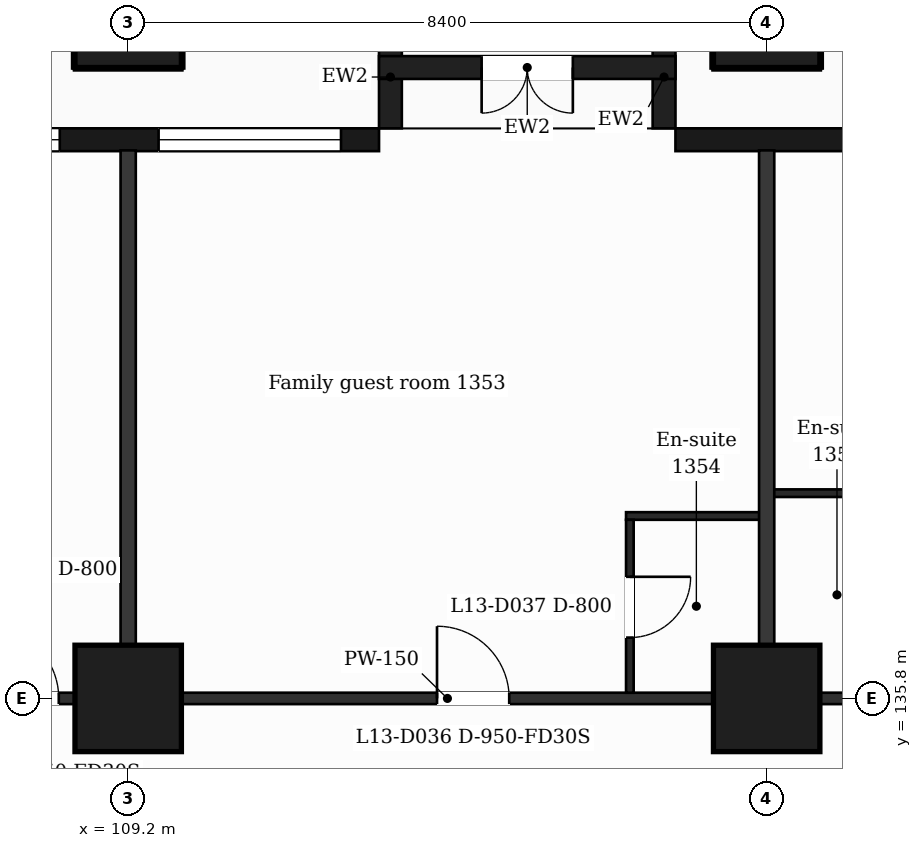
"""IFC4 building model, lengths in metres.
Left out: names, types, materials, properties, quantities, classifications, styles, units other than length and angle.
Written with IfcOpenShell. Run it as: python <this file> out.ifc"""

import sys

from ifc_helpers import new_model, si_unit, direction, frame, frame_2d, origin, origin_2d, place, context, subcontext, project, spatial, rectangle, extrude, element, fill, save


model = new_model("IFC4")
c1 = context("Model", 3, precision=1e-05, world=origin(), true_north=direction((0.0, 1.0)))
c2 = subcontext(c1, "Body", "Model", "MODEL_VIEW")
j1 = project(units=[si_unit("LENGTHUNIT", "METRE"), si_unit("PLANEANGLEUNIT", "RADIAN")], contexts=[c1])
p1 = place(None, origin())
s1 = spatial("IfcSite", under=j1, at=p1, CompositionType="ELEMENT")
p2 = place(p1, origin())
s2 = spatial("IfcBuilding", under=s1, at=p2, CompositionType="ELEMENT")
p3 = place(p2, frame((0.0, 0.0, 63.5)))
s3 = spatial("IfcBuildingStorey", under=s2, at=p3, CompositionType="ELEMENT", Elevation=63.5)
for number, where, z_axis, x_axis in (
    (1, (109.2, 135.8, 0.0), (0.0, 0.0, 1.0), (1.0, 0.0, 0.0)),
    (2, (117.6, 135.8, 0.0), (0.0, 0.0, 1.0), (1.0, 0.0, 0.0)),
    (3, (109.2, 144.8, 0.0), (0.0, 0.0, 1.0), (1.0, 0.0, 0.0)),
    (4, (117.6, 144.8, 0.0), (0.0, 0.0, 1.0), (1.0, 0.0, 0.0)),
):
    element("IfcColumn", number, at=place(p3, frame(where, z_axis=z_axis, x_axis=x_axis)), inside=s3, PredefinedType="COLUMN", context=c2, shape_type="SweptSolid", body=[
        extrude(rectangle(XDim=1.4, YDim=1.4, at=origin_2d()), origin(), (0.0, 0.0, 1.0), 3.5),
    ])
p4 = place(p3, frame((130.65, 143.15, 0.0), z_axis=(0.0, 0.0, 1.0), x_axis=(-1.0, 0.0, 0.0)))
e5 = element("IfcWall", 5, at=p4, inside=s3, PredefinedType="SOLIDWALL", context=c2, shape_type="SweptSolid", body=[
    extrude(rectangle(XDim=14.25, YDim=0.3, at=frame_2d((7.125, 0.0))), origin(), (0.0, 0.0, 1.0), 3.18),
])
p5 = place(p4, frame((1.35, 0.0, 0.9)))
e6 = element("IfcOpeningElement", 6, at=p5, cuts=e5, PredefinedType="OPENING", context=c2, shape_type="SweptSolid", body=[
    extrude(rectangle(XDim=2.4, YDim=2.1, at=frame_2d((1.2, 1.05))), frame((0.0, 0.16, 0.0), z_axis=(0.0, -1.0, 0.0), x_axis=(1.0, 0.0, 0.0)), (0.0, 0.0, 1.0), 0.32),
])
p6 = place(p4, frame((6.15, 0.0, 0.0)))
e7 = element("IfcOpeningElement", 7, at=p6, cuts=e5, PredefinedType="OPENING", context=c2, shape_type="SweptSolid", body=[
    extrude(rectangle(XDim=1.2, YDim=2.4, at=frame_2d((0.6, 1.2))), frame((0.0, 0.16, 0.0), z_axis=(0.0, -1.0, 0.0), x_axis=(1.0, 0.0, 0.0)), (0.0, 0.0, 1.0), 0.32),
])
p7 = place(p4, frame((10.35, 0.0, 0.9)))
e8 = element("IfcOpeningElement", 8, at=p7, cuts=e5, PredefinedType="OPENING", context=c2, shape_type="SweptSolid", body=[
    extrude(rectangle(XDim=1.2, YDim=2.1, at=frame_2d((0.6, 1.05))), frame((0.0, 0.16, 0.0), z_axis=(0.0, -1.0, 0.0), x_axis=(1.0, 0.0, 0.0)), (0.0, 0.0, 1.0), 0.32),
])
p8 = place(p3, frame((112.5, 143.15, 0.0), z_axis=(0.0, 0.0, 1.0), x_axis=(-1.0, 0.0, 0.0)))
e9 = element("IfcWall", 9, at=p8, inside=s3, PredefinedType="SOLIDWALL", context=c2, shape_type="SweptSolid", body=[
    extrude(rectangle(XDim=16.5, YDim=0.3, at=frame_2d((8.25, 0.0))), origin(), (0.0, 0.0, 1.0), 3.18),
])
p9 = place(p8, frame((0.5, 0.0, 0.9)))
e10 = element("IfcOpeningElement", 10, at=p9, cuts=e9, PredefinedType="OPENING", context=c2, shape_type="SweptSolid", body=[
    extrude(rectangle(XDim=2.4, YDim=2.1, at=frame_2d((1.2, 1.05))), frame((0.0, 0.16, 0.0), z_axis=(0.0, -1.0, 0.0), x_axis=(1.0, 0.0, 0.0)), (0.0, 0.0, 1.0), 0.32),
])
p10 = place(p8, frame((4.2, 0.0, 0.9)))
e11 = element("IfcOpeningElement", 11, at=p10, cuts=e9, PredefinedType="OPENING", context=c2, shape_type="SweptSolid", body=[
    extrude(rectangle(XDim=2.4, YDim=2.1, at=frame_2d((1.2, 1.05))), frame((0.0, 0.16, 0.0), z_axis=(0.0, -1.0, 0.0), x_axis=(1.0, 0.0, 0.0)), (0.0, 0.0, 1.0), 0.32),
])
p11 = place(p8, frame((9.0, 0.0, 0.0)))
e12 = element("IfcOpeningElement", 12, at=p11, cuts=e9, PredefinedType="OPENING", context=c2, shape_type="SweptSolid", body=[
    extrude(rectangle(XDim=1.2, YDim=2.4, at=frame_2d((0.6, 1.2))), frame((0.0, 0.16, 0.0), z_axis=(0.0, -1.0, 0.0), x_axis=(1.0, 0.0, 0.0)), (0.0, 0.0, 1.0), 0.32),
])
p12 = place(p8, frame((12.6, 0.0, 0.9)))
e13 = element("IfcOpeningElement", 13, at=p12, cuts=e9, PredefinedType="OPENING", context=c2, shape_type="SweptSolid", body=[
    extrude(rectangle(XDim=2.4, YDim=2.1, at=frame_2d((1.2, 1.05))), frame((0.0, 0.16, 0.0), z_axis=(0.0, -1.0, 0.0), x_axis=(1.0, 0.0, 0.0)), (0.0, 0.0, 1.0), 0.32),
])
for number, where, z_axis, x_axis in (
    (14, (116.25, 143.3, 0.0), (0.0, 0.0, 1.0), (0.0, 1.0, 0.0)),
    (15, (112.65, 143.3, 0.0), (0.0, 0.0, 1.0), (0.0, 1.0, 0.0)),
):
    element("IfcWall", number, at=place(p3, frame(where, z_axis=z_axis, x_axis=x_axis)), inside=s3, PredefinedType="SOLIDWALL", context=c2, shape_type="SweptSolid", body=[
        extrude(rectangle(XDim=1.35, YDim=0.3, at=frame_2d((0.675, 0.0))), origin(), (0.0, 0.0, 1.0), 3.18),
    ])
p13 = place(p3, frame((116.4, 144.1, 0.0), z_axis=(0.0, 0.0, 1.0), x_axis=(-1.0, 0.0, 0.0)))
e16 = element("IfcWall", 16, at=p13, inside=s3, PredefinedType="SOLIDWALL", context=c2, shape_type="SweptSolid", body=[
    extrude(rectangle(XDim=3.9, YDim=0.3, at=frame_2d((1.95, 0.0))), origin(), (0.0, 0.0, 1.0), 3.18),
])
p14 = place(p13, frame((1.35, 0.0, 0.0)))
e17 = element("IfcOpeningElement", 17, at=p14, cuts=e16, PredefinedType="OPENING", context=c2, shape_type="SweptSolid", body=[
    extrude(rectangle(XDim=1.2, YDim=2.4, at=frame_2d((0.6, 1.2))), frame((0.0, 0.16, 0.0), z_axis=(0.0, -1.0, 0.0), x_axis=(1.0, 0.0, 0.0)), (0.0, 0.0, 1.0), 0.32),
])
p15 = place(p3, frame((90.895, 135.8, 0.0), z_axis=(0.0, 0.0, 1.0), x_axis=(1.0, 0.0, 0.0)))
e18 = element("IfcWall", 18, at=p15, inside=s3, PredefinedType="PARTITIONING", context=c2, shape_type="SweptSolid", body=[
    extrude(rectangle(XDim=45.011, YDim=0.15, at=frame_2d((22.505, 0.0))), origin(), (0.0, 0.0, 1.0), 3.18),
])
p16 = place(p15, frame((7.675, 0.0, 0.0)))
e19 = element("IfcOpeningElement", 19, at=p16, cuts=e18, PredefinedType="OPENING", context=c2, shape_type="SweptSolid", body=[
    extrude(rectangle(XDim=1.0, YDim=2.1, at=frame_2d((0.5, 1.05))), frame((0.0, 0.085, 0.0), z_axis=(0.0, -1.0, 0.0), x_axis=(1.0, 0.0, 0.0)), (0.0, 0.0, 1.0), 0.17),
])
p17 = place(p15, frame((10.892, 0.0, 0.0)))
e20 = element("IfcOpeningElement", 20, at=p17, cuts=e18, PredefinedType="OPENING", context=c2, shape_type="SweptSolid", body=[
    extrude(rectangle(XDim=0.95, YDim=2.1, at=frame_2d((0.475, 1.05))), frame((0.0, 0.085, 0.0), z_axis=(0.0, -1.0, 0.0), x_axis=(1.0, 0.0, 0.0)), (0.0, 0.0, 1.0), 0.17),
])
p18 = place(p15, frame((16.442, 0.0, 0.0)))
e21 = element("IfcOpeningElement", 21, at=p18, cuts=e18, PredefinedType="OPENING", context=c2, shape_type="SweptSolid", body=[
    extrude(rectangle(XDim=0.95, YDim=2.1, at=frame_2d((0.475, 1.05))), frame((0.0, 0.085, 0.0), z_axis=(0.0, -1.0, 0.0), x_axis=(1.0, 0.0, 0.0)), (0.0, 0.0, 1.0), 0.17),
])
p19 = place(p15, frame((22.368, 0.0, 0.0)))
e22 = element("IfcOpeningElement", 22, at=p19, cuts=e18, PredefinedType="OPENING", context=c2, shape_type="SweptSolid", body=[
    extrude(rectangle(XDim=0.95, YDim=2.1, at=frame_2d((0.475, 1.05))), frame((0.0, 0.085, 0.0), z_axis=(0.0, -1.0, 0.0), x_axis=(1.0, 0.0, 0.0)), (0.0, 0.0, 1.0), 0.17),
])
p20 = place(p15, frame((31.825, 0.0, 0.0)))
e23 = element("IfcOpeningElement", 23, at=p20, cuts=e18, PredefinedType="OPENING", context=c2, shape_type="SweptSolid", body=[
    extrude(rectangle(XDim=0.95, YDim=2.1, at=frame_2d((0.475, 1.05))), frame((0.0, 0.085, 0.0), z_axis=(0.0, -1.0, 0.0), x_axis=(1.0, 0.0, 0.0)), (0.0, 0.0, 1.0), 0.17),
])
p21 = place(p15, frame((36.775, 0.0, 0.0)))
e24 = element("IfcOpeningElement", 24, at=p21, cuts=e18, PredefinedType="OPENING", context=c2, shape_type="SweptSolid", body=[
    extrude(rectangle(XDim=1.0, YDim=2.1, at=frame_2d((0.5, 1.05))), frame((0.0, 0.085, 0.0), z_axis=(0.0, -1.0, 0.0), x_axis=(1.0, 0.0, 0.0)), (0.0, 0.0, 1.0), 0.17),
])
p22 = place(p3, frame((115.75, 138.2, 0.0), z_axis=(0.0, 0.0, 1.0), x_axis=(1.0, 0.0, 0.0)))
e25 = element("IfcWall", 25, at=p22, inside=s3, PredefinedType="PARTITIONING", context=c2, shape_type="SweptSolid", body=[
    extrude(rectangle(XDim=1.85, YDim=0.1, at=frame_2d((0.925, 0.0))), origin(), (0.0, 0.0, 1.0), 3.18),
])
p23 = place(p3, frame((117.6, 138.5, 0.0), z_axis=(0.0, 0.0, 1.0), x_axis=(1.0, 0.0, 0.0)))
e26 = element("IfcWall", 26, at=p23, inside=s3, PredefinedType="PARTITIONING", context=c2, shape_type="SweptSolid", body=[
    extrude(rectangle(XDim=1.85, YDim=0.1, at=frame_2d((0.925, 0.0))), origin(), (0.0, 0.0, 1.0), 3.18),
])
p24 = place(p3, frame((109.2, 135.875, 0.0), z_axis=(0.0, 0.0, 1.0), x_axis=(0.0, 1.0, 0.0)))
e27 = element("IfcWall", 27, at=p24, inside=s3, PredefinedType="PARTITIONING", context=c2, shape_type="SweptSolid", body=[
    extrude(rectangle(XDim=7.135, YDim=0.2, at=frame_2d((3.567, 0.0))), origin(), (0.0, 0.0, 1.0), 3.18),
])
p25 = place(p3, frame((115.8, 135.875, 0.0), z_axis=(0.0, 0.0, 1.0), x_axis=(0.0, 1.0, 0.0)))
e28 = element("IfcWall", 28, at=p25, inside=s3, PredefinedType="PARTITIONING", context=c2, shape_type="SweptSolid", body=[
    extrude(rectangle(XDim=2.275, YDim=0.1, at=frame_2d((1.137, 0.0))), origin(), (0.0, 0.0, 1.0), 3.18),
])
p26 = place(p25, frame((0.725, 0.0, 0.0)))
e29 = element("IfcOpeningElement", 29, at=p26, cuts=e28, PredefinedType="OPENING", context=c2, shape_type="SweptSolid", body=[
    extrude(rectangle(XDim=0.8, YDim=2.1, at=frame_2d((0.4, 1.05))), frame((0.0, 0.06, 0.0), z_axis=(0.0, -1.0, 0.0), x_axis=(1.0, 0.0, 0.0)), (0.0, 0.0, 1.0), 0.12),
])
p27 = place(p3, frame((117.6, 135.875, 0.0), z_axis=(0.0, 0.0, 1.0), x_axis=(0.0, 1.0, 0.0)))
e30 = element("IfcWall", 30, at=p27, inside=s3, PredefinedType="PARTITIONING", context=c2, shape_type="SweptSolid", body=[
    extrude(rectangle(XDim=7.135, YDim=0.2, at=frame_2d((3.567, 0.0))), origin(), (0.0, 0.0, 1.0), 3.18),
])
p28 = place(p9, origin())
e31 = element("IfcWindow", 31, at=p28, inside=s3, PartitioningType="SINGLE_PANEL", PredefinedType="WINDOW", context=c2, shape_type="SweptSolid", body=[
    extrude(rectangle(XDim=2.4, YDim=2.1, at=frame_2d((1.2, 1.05))), frame((0.0, 0.03, 0.0), z_axis=(0.0, -1.0, 0.0), x_axis=(1.0, 0.0, 0.0)), (0.0, 0.0, 1.0), 0.06),
])
fill(e10, e31)
p29 = place(p10, origin())
e32 = element("IfcWindow", 32, at=p29, inside=s3, PartitioningType="SINGLE_PANEL", PredefinedType="WINDOW", context=c2, shape_type="SweptSolid", body=[
    extrude(rectangle(XDim=2.4, YDim=2.1, at=frame_2d((1.2, 1.05))), frame((0.0, 0.03, 0.0), z_axis=(0.0, -1.0, 0.0), x_axis=(1.0, 0.0, 0.0)), (0.0, 0.0, 1.0), 0.06),
])
fill(e11, e32)
p30 = place(p14, origin())
e33 = element("IfcDoor", 33, at=p30, inside=s3, OperationType="DOUBLE_DOOR_SINGLE_SWING", PredefinedType="DOOR", context=c2, shape_type="SweptSolid", body=[
    extrude(rectangle(XDim=1.2, YDim=2.4, at=frame_2d((0.6, 1.2))), frame((0.0, 0.025, 0.0), z_axis=(0.0, -1.0, 0.0), x_axis=(1.0, 0.0, 0.0)), (0.0, 0.0, 1.0), 0.05),
])
fill(e17, e33)
p31 = place(p18, origin())
e34 = element("IfcDoor", 34, at=p31, inside=s3, OperationType="SINGLE_SWING_LEFT", PredefinedType="DOOR", context=c2, shape_type="SweptSolid", body=[
    extrude(rectangle(XDim=0.95, YDim=2.1, at=frame_2d((0.475, 1.05))), frame((0.0, 0.025, 0.0), z_axis=(0.0, -1.0, 0.0), x_axis=(1.0, 0.0, 0.0)), (0.0, 0.0, 1.0), 0.05),
])
fill(e21, e34)
p32 = place(p19, origin())
e35 = element("IfcDoor", 35, at=p32, inside=s3, OperationType="SINGLE_SWING_LEFT", PredefinedType="DOOR", context=c2, shape_type="SweptSolid", body=[
    extrude(rectangle(XDim=0.95, YDim=2.1, at=frame_2d((0.475, 1.05))), frame((0.0, 0.025, 0.0), z_axis=(0.0, -1.0, 0.0), x_axis=(1.0, 0.0, 0.0)), (0.0, 0.0, 1.0), 0.05),
])
fill(e22, e35)
p33 = place(p26, origin())
e36 = element("IfcDoor", 36, at=p33, inside=s3, OperationType="SINGLE_SWING_RIGHT", PredefinedType="DOOR", context=c2, shape_type="SweptSolid", body=[
    extrude(rectangle(XDim=0.8, YDim=2.1, at=frame_2d((0.4, 1.05))), frame((0.0, 0.025, 0.0), z_axis=(0.0, -1.0, 0.0), x_axis=(1.0, 0.0, 0.0)), (0.0, 0.0, 1.0), 0.05),
])
fill(e29, e36)
save(model, sys.argv[1])
